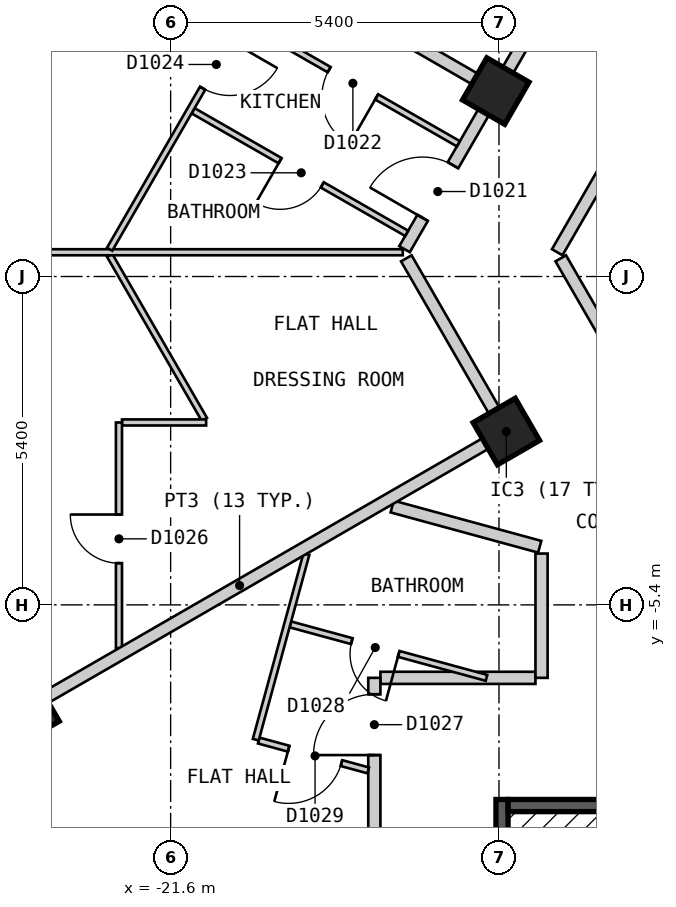
"""IFC4 building model, lengths in metres.
Left out: names, types, materials, properties, quantities, classifications, styles, units other than length and angle.
Written with IfcOpenShell. Run it as: python <this file> out.ifc"""

import sys

from ifc_helpers import new_model, si_unit, direction, frame, frame_2d, origin, origin_2d, place, context, subcontext, project, spatial, polyline, rectangle, outline, extrude, element, fill, save


model = new_model("IFC4")
c1 = context("Model", 3, precision=1e-05, world=origin(), true_north=direction((0.0, 1.0)))
c2 = subcontext(c1, "Body", "Model", "MODEL_VIEW")
j1 = project(units=[si_unit("LENGTHUNIT", "METRE"), si_unit("PLANEANGLEUNIT", "RADIAN")], contexts=[c1])
p1 = place(None, origin())
s1 = spatial("IfcSite", under=j1, at=p1, CompositionType="ELEMENT")
p2 = place(p1, origin())
s2 = spatial("IfcBuilding", under=s1, at=p2, CompositionType="ELEMENT")
p3 = place(p2, frame((0.0, 0.0, 126.6)))
s3 = spatial("IfcBuildingStorey", under=s2, at=p3, CompositionType="ELEMENT", Elevation=126.6)
p4 = place(p3, frame((-24.047, -7.149, 0.0), z_axis=(0.0, 0.0, 1.0), x_axis=(0.5, -0.866025403784, 0.0)))
e1 = element("IfcColumn", 1, at=p4, inside=s3, PredefinedType="COLUMN", context=c2, shape_type="SweptSolid", body=[
    extrude(rectangle(XDim=0.9, YDim=0.9, at=origin_2d()), origin(), (0.0, 0.0, 1.0), 3.0),
])
for number, where, z_axis, x_axis in (
    (2, (-16.079, -2.549, 0.0), (0.0, 0.0, 1.0), (0.5, -0.866, 0.0)),
    (3, (-16.253, 3.05, 0.0), (0.0, 0.0, 1.0), (-0.5, -0.866, 0.0)),
):
    element("IfcColumn", number, at=place(p3, frame(where, z_axis=z_axis, x_axis=x_axis)), inside=s3, PredefinedType="COLUMN", context=c2, shape_type="SweptSolid", body=[
        extrude(rectangle(XDim=0.8, YDim=0.8, at=origin_2d()), origin(), (0.0, 0.0, 1.0), 3.0),
    ])
p5 = place(p3, frame((-16.555, 23.025, 0.0), z_axis=(0.0, 0.0, 1.0), x_axis=(-0.500020536353, -0.866013546791, 0.0)))
e4 = element("IfcWall", 4, at=p5, inside=s3, PredefinedType="SOLIDWALL", context=c2, shape_type="SweptSolid", body=[
    extrude(outline(polyline([(0.0, -0.15), (23.325, -0.15), (23.245, 0.15), (0.08, 0.15), (0.0, -0.15)])), origin(), (0.0, 0.0, 1.0), 2.7),
])
p6 = place(p5, frame((1.314, 0.0, 0.15)))
e5 = element("IfcOpeningElement", 5, at=p6, cuts=e4, PredefinedType="OPENING", context=c2, shape_type="SweptSolid", body=[
    extrude(rectangle(XDim=1.5, YDim=2.1, at=frame_2d((0.75, 1.05))), frame((0.0, 0.16, 0.0), z_axis=(0.0, -1.0, 0.0), x_axis=(1.0, 0.0, 0.0)), (0.0, 0.0, 1.0), 0.32),
])
p7 = place(p5, frame((4.056, 0.0, 0.15)))
e6 = element("IfcOpeningElement", 6, at=p7, cuts=e4, PredefinedType="OPENING", context=c2, shape_type="SweptSolid", body=[
    extrude(rectangle(XDim=1.5, YDim=2.1, at=frame_2d((0.75, 1.05))), frame((0.0, 0.16, 0.0), z_axis=(0.0, -1.0, 0.0), x_axis=(1.0, 0.0, 0.0)), (0.0, 0.0, 1.0), 0.32),
])
p8 = place(p5, frame((6.799, 0.0, 0.15)))
e7 = element("IfcOpeningElement", 7, at=p8, cuts=e4, PredefinedType="OPENING", context=c2, shape_type="SweptSolid", body=[
    extrude(rectangle(XDim=1.5, YDim=2.1, at=frame_2d((0.75, 1.05))), frame((0.0, 0.16, 0.0), z_axis=(0.0, -1.0, 0.0), x_axis=(1.0, 0.0, 0.0)), (0.0, 0.0, 1.0), 0.32),
])
p9 = place(p5, frame((9.541, 0.0, 0.15)))
e8 = element("IfcOpeningElement", 8, at=p9, cuts=e4, PredefinedType="OPENING", context=c2, shape_type="SweptSolid", body=[
    extrude(rectangle(XDim=1.5, YDim=2.1, at=frame_2d((0.75, 1.05))), frame((0.0, 0.16, 0.0), z_axis=(0.0, -1.0, 0.0), x_axis=(1.0, 0.0, 0.0)), (0.0, 0.0, 1.0), 0.32),
])
p10 = place(p5, frame((12.285, 0.0, 0.15)))
e9 = element("IfcOpeningElement", 9, at=p10, cuts=e4, PredefinedType="OPENING", context=c2, shape_type="SweptSolid", body=[
    extrude(rectangle(XDim=1.5, YDim=2.1, at=frame_2d((0.75, 1.05))), frame((0.0, 0.16, 0.0), z_axis=(0.0, -1.0, 0.0), x_axis=(1.0, 0.0, 0.0)), (0.0, 0.0, 1.0), 0.32),
])
p11 = place(p5, frame((15.027, 0.0, 0.15)))
e10 = element("IfcOpeningElement", 10, at=p11, cuts=e4, PredefinedType="OPENING", context=c2, shape_type="SweptSolid", body=[
    extrude(rectangle(XDim=1.5, YDim=2.1, at=frame_2d((0.75, 1.05))), frame((0.0, 0.16, 0.0), z_axis=(0.0, -1.0, 0.0), x_axis=(1.0, 0.0, 0.0)), (0.0, 0.0, 1.0), 0.32),
])
p12 = place(p5, frame((17.769, 0.0, 0.15)))
e11 = element("IfcOpeningElement", 11, at=p12, cuts=e4, PredefinedType="OPENING", context=c2, shape_type="SweptSolid", body=[
    extrude(rectangle(XDim=1.5, YDim=2.1, at=frame_2d((0.75, 1.05))), frame((0.0, 0.16, 0.0), z_axis=(0.0, -1.0, 0.0), x_axis=(1.0, 0.0, 0.0)), (0.0, 0.0, 1.0), 0.32),
])
p13 = place(p5, frame((20.512, 0.0, 0.15)))
e12 = element("IfcOpeningElement", 12, at=p13, cuts=e4, PredefinedType="OPENING", context=c2, shape_type="SweptSolid", body=[
    extrude(rectangle(XDim=1.5, YDim=2.1, at=frame_2d((0.75, 1.05))), frame((0.0, 0.16, 0.0), z_axis=(0.0, -1.0, 0.0), x_axis=(1.0, 0.0, 0.0)), (0.0, 0.0, 1.0), 0.32),
])
p14 = place(p3, frame((-28.218, -2.025, 0.0), z_axis=(0.0, 0.0, 1.0), x_axis=(0.500017503135, -0.866015298109, 0.0)))
e13 = element("IfcWall", 13, at=p14, inside=s3, PredefinedType="SOLIDWALL", context=c2, shape_type="SweptSolid", body=[
    extrude(outline(polyline([(0.0, -0.15), (24.711, -0.15), (24.631, 0.15), (0.08, 0.15), (0.0, -0.15)])), origin(), (0.0, 0.0, 1.0), 2.7),
])
p15 = place(p14, frame((1.4, 0.0, 0.15)))
e14 = element("IfcOpeningElement", 14, at=p15, cuts=e13, PredefinedType="OPENING", context=c2, shape_type="SweptSolid", body=[
    extrude(rectangle(XDim=1.5, YDim=2.1, at=frame_2d((0.75, 1.05))), frame((0.0, 0.16, 0.0), z_axis=(0.0, -1.0, 0.0), x_axis=(1.0, 0.0, 0.0)), (0.0, 0.0, 1.0), 0.32),
])
p16 = place(p14, frame((4.316, 0.0, 0.15)))
e15 = element("IfcOpeningElement", 15, at=p16, cuts=e13, PredefinedType="OPENING", context=c2, shape_type="SweptSolid", body=[
    extrude(rectangle(XDim=1.5, YDim=2.1, at=frame_2d((0.75, 1.05))), frame((0.0, 0.16, 0.0), z_axis=(0.0, -1.0, 0.0), x_axis=(1.0, 0.0, 0.0)), (0.0, 0.0, 1.0), 0.32),
])
p17 = place(p14, frame((7.231, 0.0, 0.15)))
e16 = element("IfcOpeningElement", 16, at=p17, cuts=e13, PredefinedType="OPENING", context=c2, shape_type="SweptSolid", body=[
    extrude(rectangle(XDim=1.5, YDim=2.1, at=frame_2d((0.75, 1.05))), frame((0.0, 0.16, 0.0), z_axis=(0.0, -1.0, 0.0), x_axis=(1.0, 0.0, 0.0)), (0.0, 0.0, 1.0), 0.32),
])
p18 = place(p14, frame((10.147, 0.0, 0.15)))
e17 = element("IfcOpeningElement", 17, at=p18, cuts=e13, PredefinedType="OPENING", context=c2, shape_type="SweptSolid", body=[
    extrude(rectangle(XDim=1.5, YDim=2.1, at=frame_2d((0.75, 1.05))), frame((0.0, 0.16, 0.0), z_axis=(0.0, -1.0, 0.0), x_axis=(1.0, 0.0, 0.0)), (0.0, 0.0, 1.0), 0.32),
])
p19 = place(p14, frame((13.062, 0.0, 0.15)))
e18 = element("IfcOpeningElement", 18, at=p19, cuts=e13, PredefinedType="OPENING", context=c2, shape_type="SweptSolid", body=[
    extrude(rectangle(XDim=1.5, YDim=2.1, at=frame_2d((0.75, 1.05))), frame((0.0, 0.16, 0.0), z_axis=(0.0, -1.0, 0.0), x_axis=(1.0, 0.0, 0.0)), (0.0, 0.0, 1.0), 0.32),
])
p20 = place(p14, frame((15.977, 0.0, 0.15)))
e19 = element("IfcOpeningElement", 19, at=p20, cuts=e13, PredefinedType="OPENING", context=c2, shape_type="SweptSolid", body=[
    extrude(rectangle(XDim=1.5, YDim=2.1, at=frame_2d((0.75, 1.05))), frame((0.0, 0.16, 0.0), z_axis=(0.0, -1.0, 0.0), x_axis=(1.0, 0.0, 0.0)), (0.0, 0.0, 1.0), 0.32),
])
p21 = place(p14, frame((18.893, 0.0, 0.15)))
e20 = element("IfcOpeningElement", 20, at=p21, cuts=e13, PredefinedType="OPENING", context=c2, shape_type="SweptSolid", body=[
    extrude(rectangle(XDim=1.5, YDim=2.1, at=frame_2d((0.75, 1.05))), frame((0.0, 0.16, 0.0), z_axis=(0.0, -1.0, 0.0), x_axis=(1.0, 0.0, 0.0)), (0.0, 0.0, 1.0), 0.32),
])
p22 = place(p14, frame((21.809, 0.0, 0.15)))
e21 = element("IfcOpeningElement", 21, at=p22, cuts=e13, PredefinedType="OPENING", context=c2, shape_type="SweptSolid", body=[
    extrude(rectangle(XDim=1.5, YDim=2.1, at=frame_2d((0.75, 1.05))), frame((0.0, 0.16, 0.0), z_axis=(0.0, -1.0, 0.0), x_axis=(1.0, 0.0, 0.0)), (0.0, 0.0, 1.0), 0.32),
])
p23 = place(p3, frame((-15.184, 0.299, 0.0), z_axis=(0.0, 0.0, 1.0), x_axis=(0.500149577091, -0.865939028186, 0.0)))
e22 = element("IfcWall", 22, at=p23, inside=s3, PredefinedType="PARTITIONING", context=c2, shape_type="SweptSolid", body=[
    extrude(rectangle(XDim=3.463, YDim=0.2, at=frame_2d((1.732, 0.0))), origin(), (0.0, 0.0, 1.0), 2.7),
])
p24 = place(p3, frame((-17.724, 0.299, 0.0), z_axis=(0.0, 0.0, 1.0), x_axis=(0.499910220442, -0.866077231832, 0.0)))
e23 = element("IfcWall", 23, at=p24, inside=s3, PredefinedType="PARTITIONING", context=c2, shape_type="SweptSolid", body=[
    extrude(rectangle(XDim=3.189, YDim=0.2, at=frame_2d((1.594, 0.0))), origin(), (0.0, 0.0, 1.0), 2.7),
])
p25 = place(p3, frame((-18.15, -6.6, 0.0), z_axis=(0.0, 0.0, 1.0), x_axis=(1.0, 0.0, 0.0)))
e24 = element("IfcWall", 24, at=p25, inside=s3, PredefinedType="PARTITIONING", context=c2, shape_type="SweptSolid", body=[
    extrude(rectangle(XDim=2.55, YDim=0.2, at=frame_2d((1.275, 0.0))), origin(), (0.0, 0.0, 1.0), 2.7),
])
p26 = place(p3, frame((-15.242, 0.399, 0.0), z_axis=(0.0, 0.0, 1.0), x_axis=(0.499953615651, 0.866052182145, 0.0)))
e25 = element("IfcWall", 25, at=p26, inside=s3, PredefinedType="PARTITIONING", context=c2, shape_type="SweptSolid", body=[
    extrude(rectangle(XDim=8.777, YDim=0.2, at=frame_2d((4.388, 0.0))), origin(), (0.0, 0.0, 1.0), 2.7),
])
p27 = place(p26, frame((3.938, 0.0, 0.0)))
e26 = element("IfcOpeningElement", 26, at=p27, cuts=e25, PredefinedType="OPENING", context=c2, shape_type="SweptSolid", body=[
    extrude(rectangle(XDim=0.9, YDim=2.1, at=frame_2d((0.45, 1.05))), frame((0.0, 0.11, 0.0), z_axis=(0.0, -1.0, 0.0), x_axis=(1.0, 0.0, 0.0)), (0.0, 0.0, 1.0), 0.22),
])
p28 = place(p3, frame((-17.753, 0.45, 0.0), z_axis=(0.0, 0.0, 1.0), x_axis=(0.499990970252, 0.866030617049, 0.0)))
e27 = element("IfcWall", 27, at=p28, inside=s3, PredefinedType="PARTITIONING", context=c2, shape_type="SweptSolid", body=[
    extrude(rectangle(XDim=16.974, YDim=0.2, at=frame_2d((8.487, 0.0))), origin(), (0.0, 0.0, 1.0), 2.7),
])
p29 = place(p28, frame((10.73, 0.0, 0.0)))
e28 = element("IfcOpeningElement", 28, at=p29, cuts=e27, PredefinedType="OPENING", context=c2, shape_type="SweptSolid", body=[
    extrude(rectangle(XDim=1.0, YDim=2.1, at=frame_2d((0.5, 1.05))), frame((0.0, 0.11, 0.0), z_axis=(0.0, -1.0, 0.0), x_axis=(1.0, 0.0, 0.0)), (0.0, 0.0, 1.0), 0.22),
])
p30 = place(p28, frame((5.245, 0.0, 0.0)))
e29 = element("IfcOpeningElement", 29, at=p30, cuts=e27, PredefinedType="OPENING", context=c2, shape_type="SweptSolid", body=[
    extrude(rectangle(XDim=1.0, YDim=2.1, at=frame_2d((0.5, 1.05))), frame((0.0, 0.11, 0.0), z_axis=(0.0, -1.0, 0.0), x_axis=(1.0, 0.0, 0.0)), (0.0, 0.0, 1.0), 0.22),
])
p31 = place(p28, frame((0.594, 0.0, 0.0)))
e30 = element("IfcOpeningElement", 30, at=p31, cuts=e27, PredefinedType="OPENING", context=c2, shape_type="SweptSolid", body=[
    extrude(rectangle(XDim=1.0, YDim=2.1, at=frame_2d((0.5, 1.05))), frame((0.0, 0.11, 0.0), z_axis=(0.0, -1.0, 0.0), x_axis=(1.0, 0.0, 0.0)), (0.0, 0.0, 1.0), 0.22),
])
p32 = place(p3, frame((-15.5, -6.6, 0.0), z_axis=(0.0, 0.0, 1.0), x_axis=(0.0, 1.0, 0.0)))
e31 = element("IfcWall", 31, at=p32, inside=s3, PredefinedType="PARTITIONING", context=c2, shape_type="SweptSolid", body=[
    extrude(rectangle(XDim=2.044, YDim=0.2, at=frame_2d((1.022, 0.0))), origin(), (0.0, 0.0, 1.0), 2.7),
])
p33 = place(p3, frame((-18.25, -10.478, 0.0), z_axis=(0.0, 0.0, 1.0), x_axis=(0.0, 1.0, 0.0)))
e32 = element("IfcWall", 32, at=p33, inside=s3, PredefinedType="PARTITIONING", context=c2, shape_type="SweptSolid", body=[
    extrude(rectangle(XDim=3.878, YDim=0.2, at=frame_2d((1.939, 0.0))), origin(), (0.0, 0.0, 1.0), 2.7),
])
p34 = place(p33, frame((2.608, 0.0, 0.0)))
e33 = element("IfcOpeningElement", 33, at=p34, cuts=e32, PredefinedType="OPENING", context=c2, shape_type="SweptSolid", body=[
    extrude(rectangle(XDim=1.0, YDim=2.1, at=frame_2d((0.5, 1.05))), frame((0.0, 0.11, 0.0), z_axis=(0.0, -1.0, 0.0), x_axis=(1.0, 0.0, 0.0)), (0.0, 0.0, 1.0), 0.22),
])
p35 = place(p3, frame((-22.603, 0.349, 0.0), z_axis=(0.0, 0.0, 1.0), x_axis=(0.499930403552, -0.866065581584, 0.0)))
e34 = element("IfcWall", 34, at=p35, inside=s3, PredefinedType="PARTITIONING", context=c2, shape_type="SweptSolid", body=[
    extrude(rectangle(XDim=3.117, YDim=0.1, at=frame_2d((1.558, 0.0))), origin(), (0.0, 0.0, 1.0), 2.7),
])
p36 = place(p3, frame((-19.631, -5.721, 0.0), z_axis=(0.0, 0.0, 1.0), x_axis=(0.964816035809, -0.262925877475, 0.0)))
e35 = element("IfcWall", 35, at=p36, inside=s3, PredefinedType="PARTITIONING", context=c2, shape_type="SweptSolid", body=[
    extrude(rectangle(XDim=3.344, YDim=0.1, at=frame_2d((1.672, 0.0))), origin(), (0.0, 0.0, 1.0), 2.7),
])
p37 = place(p36, frame((1.047, 0.0, 0.0)))
e36 = element("IfcOpeningElement", 36, at=p37, cuts=e35, PredefinedType="OPENING", context=c2, shape_type="SweptSolid", body=[
    extrude(rectangle(XDim=0.8, YDim=2.1, at=frame_2d((0.4, 1.05))), frame((0.0, 0.06, 0.0), z_axis=(0.0, -1.0, 0.0), x_axis=(1.0, 0.0, 0.0)), (0.0, 0.0, 1.0), 0.12),
])
p38 = place(p3, frame((-20.151, -7.631, 0.0), z_axis=(0.0, 0.0, 1.0), x_axis=(0.964784947449, -0.263039930765, 0.0)))
e37 = element("IfcWall", 37, at=p38, inside=s3, PredefinedType="PARTITIONING", context=c2, shape_type="SweptSolid", body=[
    extrude(rectangle(XDim=1.866, YDim=0.1, at=frame_2d((0.933, 0.0))), origin(), (0.0, 0.0, 1.0), 2.7),
])
p39 = place(p38, frame((0.51, 0.0, 0.0)))
e38 = element("IfcOpeningElement", 38, at=p39, cuts=e37, PredefinedType="OPENING", context=c2, shape_type="SweptSolid", body=[
    extrude(rectangle(XDim=0.9, YDim=2.1, at=frame_2d((0.45, 1.05))), frame((0.0, 0.06, 0.0), z_axis=(0.0, -1.0, 0.0), x_axis=(1.0, 0.0, 0.0)), (0.0, 0.0, 1.0), 0.12),
])
p40 = place(p3, frame((-20.381, 4.198, 0.0), z_axis=(0.0, 0.0, 1.0), x_axis=(0.867459321792, -0.497508115549, 0.0)))
e39 = element("IfcWall", 39, at=p40, inside=s3, PredefinedType="PARTITIONING", context=c2, shape_type="SweptSolid", body=[
    extrude(rectangle(XDim=4.05, YDim=0.1, at=frame_2d((2.025, 0.0))), origin(), (0.0, 0.0, 1.0), 2.7),
])
p41 = place(p40, frame((1.6, 0.0, 0.0)))
e40 = element("IfcOpeningElement", 40, at=p41, cuts=e39, PredefinedType="OPENING", context=c2, shape_type="SweptSolid", body=[
    extrude(rectangle(XDim=0.9, YDim=2.1, at=frame_2d((0.45, 1.05))), frame((0.0, 0.06, 0.0), z_axis=(0.0, -1.0, 0.0), x_axis=(1.0, 0.0, 0.0)), (0.0, 0.0, 1.0), 0.12),
])
p42 = place(p3, frame((-21.231, 2.726, 0.0), z_axis=(0.0, 0.0, 1.0), x_axis=(0.867314299312, -0.497760892607, 0.0)))
e41 = element("IfcWall", 41, at=p42, inside=s3, PredefinedType="PARTITIONING", context=c2, shape_type="SweptSolid", body=[
    extrude(rectangle(XDim=4.05, YDim=0.1, at=frame_2d((2.025, 0.0))), origin(), (0.0, 0.0, 1.0), 2.7),
])
p43 = place(p42, frame((1.65, 0.0, 0.0)))
e42 = element("IfcOpeningElement", 42, at=p43, cuts=e41, PredefinedType="OPENING", context=c2, shape_type="SweptSolid", body=[
    extrude(rectangle(XDim=0.8, YDim=2.1, at=frame_2d((0.4, 1.05))), frame((0.0, 0.06, 0.0), z_axis=(0.0, -1.0, 0.0), x_axis=(1.0, 0.0, 0.0)), (0.0, 0.0, 1.0), 0.12),
])
p44 = place(p3, frame((-22.4, -2.4, 0.0), z_axis=(0.0, 0.0, 1.0), x_axis=(1.0, 0.0, 0.0)))
e43 = element("IfcWall", 43, at=p44, inside=s3, PredefinedType="PARTITIONING", context=c2, shape_type="SweptSolid", body=[
    extrude(rectangle(XDim=1.384, YDim=0.1, at=frame_2d((0.692, 0.0))), origin(), (0.0, 0.0, 1.0), 2.7),
])
p45 = place(p3, frame((-28.048, 0.399, 0.0), z_axis=(0.0, 0.0, 1.0), x_axis=(1.0, 0.0, 0.0)))
e44 = element("IfcWall", 44, at=p45, inside=s3, PredefinedType="PARTITIONING", context=c2, shape_type="SweptSolid", body=[
    extrude(rectangle(XDim=10.266, YDim=0.1, at=frame_2d((5.133, 0.0))), origin(), (0.0, 0.0, 1.0), 2.7),
])
p46 = place(p45, frame((2.258, 0.0, 0.0)))
e45 = element("IfcOpeningElement", 45, at=p46, cuts=e44, PredefinedType="OPENING", context=c2, shape_type="SweptSolid", body=[
    extrude(rectangle(XDim=0.9, YDim=2.1, at=frame_2d((0.45, 1.05))), frame((0.0, 0.06, 0.0), z_axis=(0.0, -1.0, 0.0), x_axis=(1.0, 0.0, 0.0)), (0.0, 0.0, 1.0), 0.12),
])
p47 = place(p3, frame((-22.603, 0.449, 0.0), z_axis=(0.0, 0.0, 1.0), x_axis=(0.500022588228, 0.866012362072, 0.0)))
e46 = element("IfcWall", 46, at=p47, inside=s3, PredefinedType="PARTITIONING", context=c2, shape_type="SweptSolid", body=[
    extrude(rectangle(XDim=5.328, YDim=0.1, at=frame_2d((2.664, 0.0))), origin(), (0.0, 0.0, 1.0), 2.7),
])
p48 = place(p47, frame((3.058, 0.0, 0.0)))
e47 = element("IfcOpeningElement", 47, at=p48, cuts=e46, PredefinedType="OPENING", context=c2, shape_type="SweptSolid", body=[
    extrude(rectangle(XDim=0.9, YDim=2.1, at=frame_2d((0.45, 1.05))), frame((0.0, 0.06, 0.0), z_axis=(0.0, -1.0, 0.0), x_axis=(1.0, 0.0, 0.0)), (0.0, 0.0, 1.0), 0.12),
])
p49 = place(p3, frame((-20.2, -7.617, 0.0), z_axis=(0.0, 0.0, 1.0), x_axis=(0.263150035392, 0.964754921663, 0.0)))
e48 = element("IfcWall", 48, at=p49, inside=s3, PredefinedType="PARTITIONING", context=c2, shape_type="SweptSolid", body=[
    extrude(rectangle(XDim=3.166, YDim=0.1, at=frame_2d((1.583, 0.0))), origin(), (0.0, 0.0, 1.0), 2.7),
])
p50 = place(p3, frame((-22.45, -6.112, 0.0), z_axis=(0.0, 0.0, 1.0), x_axis=(0.0, 1.0, 0.0)))
e49 = element("IfcWall", 49, at=p50, inside=s3, PredefinedType="PARTITIONING", context=c2, shape_type="SweptSolid", body=[
    extrude(rectangle(XDim=3.712, YDim=0.1, at=frame_2d((1.856, 0.0))), origin(), (0.0, 0.0, 1.0), 2.7),
])
p51 = place(p50, frame((1.398, 0.0, 0.0)))
e50 = element("IfcOpeningElement", 50, at=p51, cuts=e49, PredefinedType="OPENING", context=c2, shape_type="SweptSolid", body=[
    extrude(rectangle(XDim=0.8, YDim=2.1, at=frame_2d((0.4, 1.05))), frame((0.0, 0.06, 0.0), z_axis=(0.0, -1.0, 0.0), x_axis=(1.0, 0.0, 0.0)), (0.0, 0.0, 1.0), 0.12),
])
p52 = place(p3, frame((-17.956, -3.783, 0.0), z_axis=(0.0, 0.0, 1.0), x_axis=(0.964815336827, -0.2629284424, 0.0)))
e51 = element("IfcWall", 51, at=p52, inside=s3, PredefinedType="PARTITIONING", context=c2, shape_type="SweptSolid", body=[
    extrude(rectangle(XDim=2.514, YDim=0.2, at=frame_2d((1.257, 0.0))), origin(), (0.0, 0.0, 1.0), 2.7),
])
p53 = place(p3, frame((-24.999, 8.1, 0.0), z_axis=(0.0, 0.0, 1.0), x_axis=(0.866016855193, -0.500014806302, 0.0)))
e52 = element("IfcWall", 52, at=p53, inside=s3, PredefinedType="PARTITIONING", context=c2, shape_type="SweptSolid", body=[
    extrude(rectangle(XDim=10.0, YDim=0.2, at=frame_2d((5.0, 0.0))), origin(), (0.0, 0.0, 1.0), 2.7),
])
p54 = place(p3, frame((-24.826, -7.599, 0.0), z_axis=(0.0, 0.0, 1.0), x_axis=(0.86599621094, 0.500050560081, 0.0)))
e53 = element("IfcWall", 53, at=p54, inside=s3, PredefinedType="PARTITIONING", context=c2, shape_type="SweptSolid", body=[
    extrude(rectangle(XDim=10.069, YDim=0.2, at=frame_2d((5.035, 0.0))), origin(), (0.0, 0.0, 1.0), 2.7),
])
p55 = place(p3, frame((-16.15, -14.4, 0.0), z_axis=(0.0, 0.0, 1.0), x_axis=(0.0, 1.0, 0.0)))
e54 = element("IfcWall", 54, at=p55, inside=s3, PredefinedType="SOLIDWALL", context=c2, shape_type="SweptSolid", body=[
    extrude(rectangle(XDim=5.8, YDim=0.2, at=frame_2d((2.9, 0.0))), origin(), (0.0, 0.0, 1.0), 2.7),
])
p56 = place(p3, frame((-16.05, -8.7, 0.0), z_axis=(0.0, 0.0, 1.0), x_axis=(1.0, 0.0, 0.0)))
e55 = element("IfcWall", 55, at=p56, inside=s3, PredefinedType="SOLIDWALL", context=c2, shape_type="SweptSolid", body=[
    extrude(rectangle(XDim=2.75, YDim=0.2, at=frame_2d((1.375, 0.0))), origin(), (0.0, 0.0, 1.0), 2.7),
])
p57 = place(p31, origin())
e56 = element("IfcDoor", 56, at=p57, inside=s3, OperationType="SINGLE_SWING_LEFT", PredefinedType="DOOR", context=c2, shape_type="SweptSolid", body=[
    extrude(rectangle(XDim=1.0, YDim=2.1, at=frame_2d((0.5, 1.05))), frame((0.0, 0.025, 0.0), z_axis=(0.0, -1.0, 0.0), x_axis=(1.0, 0.0, 0.0)), (0.0, 0.0, 1.0), 0.05),
])
fill(e30, e56)
p58 = place(p41, origin())
e57 = element("IfcDoor", 57, at=p58, inside=s3, OperationType="SINGLE_SWING_RIGHT", PredefinedType="DOOR", context=c2, shape_type="SweptSolid", body=[
    extrude(rectangle(XDim=0.9, YDim=2.1, at=frame_2d((0.45, 1.05))), frame((0.0, 0.025, 0.0), z_axis=(0.0, -1.0, 0.0), x_axis=(1.0, 0.0, 0.0)), (0.0, 0.0, 1.0), 0.05),
])
fill(e40, e57)
p59 = place(p43, origin())
e58 = element("IfcDoor", 58, at=p59, inside=s3, OperationType="SINGLE_SWING_LEFT", PredefinedType="DOOR", context=c2, shape_type="SweptSolid", body=[
    extrude(rectangle(XDim=0.8, YDim=2.1, at=frame_2d((0.4, 1.05))), frame((0.0, 0.025, 0.0), z_axis=(0.0, -1.0, 0.0), x_axis=(1.0, 0.0, 0.0)), (0.0, 0.0, 1.0), 0.05),
])
fill(e42, e58)
p60 = place(p48, origin())
e59 = element("IfcDoor", 59, at=p60, inside=s3, OperationType="SINGLE_SWING_RIGHT", PredefinedType="DOOR", context=c2, shape_type="SweptSolid", body=[
    extrude(rectangle(XDim=0.9, YDim=2.1, at=frame_2d((0.45, 1.05))), frame((0.0, 0.025, 0.0), z_axis=(0.0, -1.0, 0.0), x_axis=(1.0, 0.0, 0.0)), (0.0, 0.0, 1.0), 0.05),
])
fill(e47, e59)
p61 = place(p51, origin())
e60 = element("IfcDoor", 60, at=p61, inside=s3, OperationType="SINGLE_SWING_RIGHT", PredefinedType="DOOR", context=c2, shape_type="SweptSolid", body=[
    extrude(rectangle(XDim=0.8, YDim=2.1, at=frame_2d((0.4, 1.05))), frame((0.0, 0.025, 0.0), z_axis=(0.0, -1.0, 0.0), x_axis=(1.0, 0.0, 0.0)), (0.0, 0.0, 1.0), 0.05),
])
fill(e50, e60)
p62 = place(p34, origin())
e61 = element("IfcDoor", 61, at=p62, inside=s3, OperationType="SINGLE_SWING_LEFT", PredefinedType="DOOR", context=c2, shape_type="SweptSolid", body=[
    extrude(rectangle(XDim=1.0, YDim=2.1, at=frame_2d((0.5, 1.05))), frame((0.0, 0.025, 0.0), z_axis=(0.0, -1.0, 0.0), x_axis=(1.0, 0.0, 0.0)), (0.0, 0.0, 1.0), 0.05),
])
fill(e33, e61)
p63 = place(p37, origin())
e62 = element("IfcDoor", 62, at=p63, inside=s3, OperationType="SINGLE_SWING_RIGHT", PredefinedType="DOOR", context=c2, shape_type="SweptSolid", body=[
    extrude(rectangle(XDim=0.8, YDim=2.1, at=frame_2d((0.4, 1.05))), frame((0.0, 0.025, 0.0), z_axis=(0.0, -1.0, 0.0), x_axis=(1.0, 0.0, 0.0)), (0.0, 0.0, 1.0), 0.05),
])
fill(e36, e62)
p64 = place(p39, origin())
e63 = element("IfcDoor", 63, at=p64, inside=s3, OperationType="SINGLE_SWING_LEFT", PredefinedType="DOOR", context=c2, shape_type="SweptSolid", body=[
    extrude(rectangle(XDim=0.9, YDim=2.1, at=frame_2d((0.45, 1.05))), frame((0.0, 0.025, 0.0), z_axis=(0.0, -1.0, 0.0), x_axis=(1.0, 0.0, 0.0)), (0.0, 0.0, 1.0), 0.05),
])
fill(e38, e63)
save(model, sys.argv[1])
